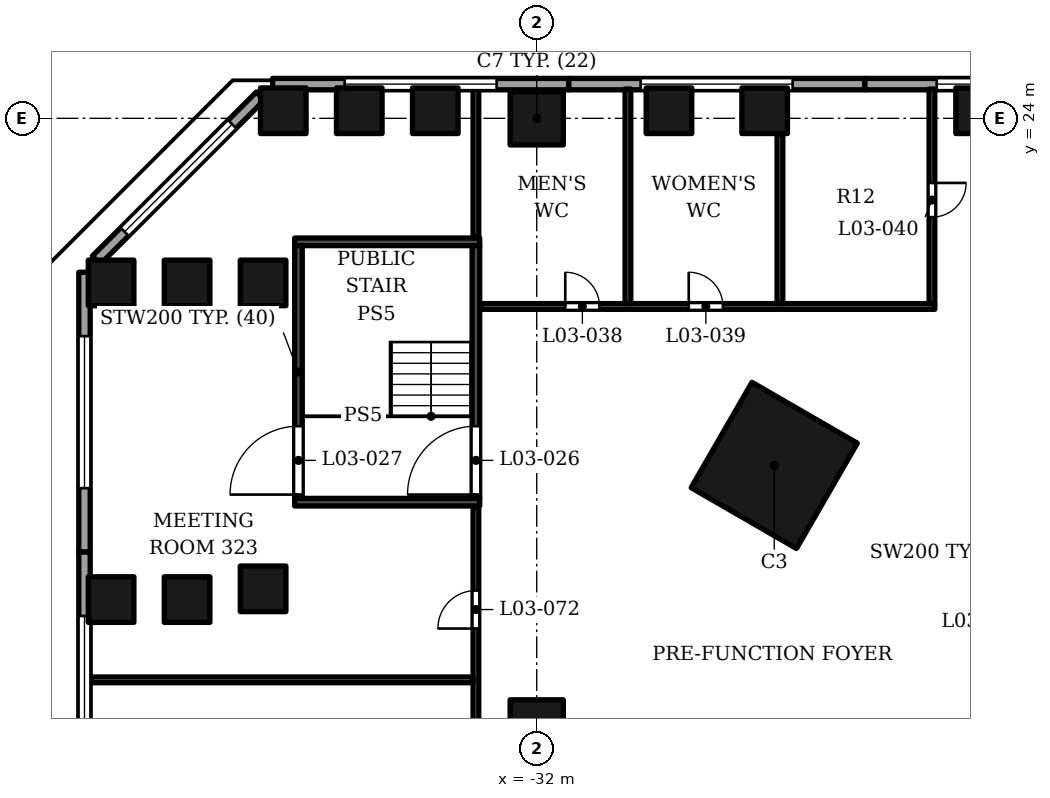
"""IFC4 building model, lengths in metres.
Left out: names, types, materials, properties, quantities, classifications, styles, units other than length and angle.
Written with IfcOpenShell. Run it as: python <this file> out.ifc"""

import sys

from ifc_helpers import new_model, si_unit, direction, frame, frame_2d, origin, origin_2d, place, context, subcontext, project, spatial, rectangle, extrude, element, fill, save


model = new_model("IFC4")
c1 = context("Model", 3, precision=1e-05, world=origin(), true_north=direction((0.0, 1.0)))
c2 = subcontext(c1, "Body", "Model", "MODEL_VIEW")
j1 = project(units=[si_unit("LENGTHUNIT", "METRE"), si_unit("PLANEANGLEUNIT", "RADIAN")], contexts=[c1])
p1 = place(None, origin())
s1 = spatial("IfcSite", under=j1, at=p1, CompositionType="ELEMENT")
p2 = place(p1, origin())
s2 = spatial("IfcBuilding", under=s1, at=p2, CompositionType="ELEMENT")
p3 = place(p2, frame((0.0, 0.0, 29.0)))
s3 = spatial("IfcBuildingStorey", under=s2, at=p3, CompositionType="ELEMENT", Elevation=29.0)
for number, where, z_axis, x_axis in (
    (1, (-32.0, 8.0, 0.0), (0.0, 0.0, 1.0), (1.0, 0.0, 0.0)),
    (2, (-32.0, 24.0, 0.0), (0.0, 0.0, 1.0), (1.0, 0.0, 0.0)),
):
    element("IfcColumn", number, at=place(p3, frame(where, z_axis=z_axis, x_axis=x_axis)), inside=s3, PredefinedType="COLUMN", context=c2, shape_type="SweptSolid", body=[
        extrude(rectangle(XDim=1.4, YDim=1.4, at=origin_2d()), origin(), (0.0, 0.0, 1.0), 5.5),
    ])
for number, where, z_axis, x_axis in (
    (3, (-39.2, 19.669, 0.0), (0.0, 0.0, 1.0), (1.0, 0.0, 0.0)),
    (4, (-34.669, 24.2, 0.0), (0.0, 0.0, 1.0), (1.0, 0.0, 0.0)),
    (5, (-39.2, 11.62, 0.0), (0.0, 0.0, 1.0), (1.0, 0.0, 0.0)),
    (6, (-26.002, 24.2, 0.0), (0.0, 0.0, 1.0), (1.0, 0.0, 0.0)),
    (7, (-41.2, 19.669, 0.0), (0.0, 0.0, 1.0), (1.0, 0.0, 0.0)),
    (8, (-36.669, 24.2, 0.0), (0.0, 0.0, 1.0), (1.0, 0.0, 0.0)),
    (9, (-41.2, 11.337, 0.0), (0.0, 0.0, 1.0), (1.0, 0.0, 0.0)),
    (10, (-28.52, 24.2, 0.0), (0.0, 0.0, 1.0), (1.0, 0.0, 0.0)),
    (11, (-20.372, 24.2, 0.0), (0.0, 0.0, 1.0), (1.0, 0.0, 0.0)),
    (12, (-43.2, 19.669, 0.0), (0.0, 0.0, 1.0), (1.0, 0.0, 0.0)),
    (13, (-38.669, 24.2, 0.0), (0.0, 0.0, 1.0), (1.0, 0.0, 0.0)),
    (14, (-43.2, 11.337, 0.0), (0.0, 0.0, 1.0), (1.0, 0.0, 0.0)),
):
    element("IfcColumn", number, at=place(p3, frame(where, z_axis=z_axis, x_axis=x_axis)), inside=s3, PredefinedType="COLUMN", context=c2, shape_type="SweptSolid", body=[
        extrude(rectangle(XDim=1.2, YDim=1.2, at=origin_2d()), origin(), (0.0, 0.0, 1.0), 5.5),
    ])
p4 = place(p3, frame((-25.75, 14.867, 0.0), z_axis=(0.0, 0.0, 1.0), x_axis=(0.866025386331, -0.50000003023, 0.0)))
e15 = element("IfcColumn", 15, at=p4, inside=s3, PredefinedType="COLUMN", context=c2, shape_type="SweptSolid", body=[
    extrude(rectangle(XDim=3.2, YDim=3.2, at=origin_2d()), origin(), (0.0, 0.0, 1.0), 5.5),
])
p5 = place(p3, frame((-15.58, 24.9, 0.0), z_axis=(0.0, 0.0, 1.0), x_axis=(-1.0, 0.0, 0.0)))
e16 = element("IfcWall", 16, at=p5, inside=s3, PredefinedType="SOLIDWALL", context=c2, shape_type="SweptSolid", body=[
    extrude(rectangle(XDim=7.79, YDim=0.3, at=frame_2d((3.895, 0.0))), origin(), (0.0, 0.0, 1.0), 4.1),
])
p6 = place(p5, frame((1.895, 0.0, 1.0)))
e17 = element("IfcOpeningElement", 17, at=p6, cuts=e16, PredefinedType="OPENING", context=c2, shape_type="SweptSolid", body=[
    extrude(rectangle(XDim=4.0, YDim=1.8, at=frame_2d((2.0, 0.9))), frame((0.0, 0.16, 0.0), z_axis=(0.0, -1.0, 0.0), x_axis=(1.0, 0.0, 0.0)), (0.0, 0.0, 1.0), 0.32),
])
p7 = place(p3, frame((-23.37, 24.9, 0.0), z_axis=(0.0, 0.0, 1.0), x_axis=(-1.0, 0.0, 0.0)))
e18 = element("IfcWall", 18, at=p7, inside=s3, PredefinedType="SOLIDWALL", context=c2, shape_type="SweptSolid", body=[
    extrude(rectangle(XDim=7.79, YDim=0.3, at=frame_2d((3.895, 0.0))), origin(), (0.0, 0.0, 1.0), 4.1),
])
p8 = place(p7, frame((1.895, 0.0, 1.0)))
e19 = element("IfcOpeningElement", 19, at=p8, cuts=e18, PredefinedType="OPENING", context=c2, shape_type="SweptSolid", body=[
    extrude(rectangle(XDim=4.0, YDim=1.8, at=frame_2d((2.0, 0.9))), frame((0.0, 0.16, 0.0), z_axis=(0.0, -1.0, 0.0), x_axis=(1.0, 0.0, 0.0)), (0.0, 0.0, 1.0), 0.32),
])
p9 = place(p3, frame((-31.16, 24.9, 0.0), z_axis=(0.0, 0.0, 1.0), x_axis=(-1.0, 0.0, 0.0)))
e20 = element("IfcWall", 20, at=p9, inside=s3, PredefinedType="SOLIDWALL", context=c2, shape_type="SweptSolid", body=[
    extrude(rectangle(XDim=7.79, YDim=0.3, at=frame_2d((3.895, 0.0))), origin(), (0.0, 0.0, 1.0), 4.1),
])
p10 = place(p9, frame((1.895, 0.0, 1.0)))
e21 = element("IfcOpeningElement", 21, at=p10, cuts=e20, PredefinedType="OPENING", context=c2, shape_type="SweptSolid", body=[
    extrude(rectangle(XDim=4.0, YDim=1.8, at=frame_2d((2.0, 0.9))), frame((0.0, 0.16, 0.0), z_axis=(0.0, -1.0, 0.0), x_axis=(1.0, 0.0, 0.0)), (0.0, 0.0, 1.0), 0.32),
])
p11 = place(p3, frame((-39.271, 24.588, 0.0), z_axis=(0.0, 0.0, 1.0), x_axis=(-0.707106781187, -0.707106781187, 0.0)))
e22 = element("IfcWall", 22, at=p11, inside=s3, PredefinedType="SOLIDWALL", context=c2, shape_type="SweptSolid", body=[
    extrude(rectangle(XDim=6.105, YDim=0.3, at=frame_2d((3.052, 0.0))), origin(), (0.0, 0.0, 1.0), 4.1),
])
p12 = place(p11, frame((1.052, 0.0, 1.0)))
e23 = element("IfcOpeningElement", 23, at=p12, cuts=e22, PredefinedType="OPENING", context=c2, shape_type="SweptSolid", body=[
    extrude(rectangle(XDim=4.0, YDim=1.8, at=frame_2d((2.0, 0.9))), frame((0.0, 0.16, 0.0), z_axis=(0.0, -1.0, 0.0), x_axis=(1.0, 0.0, 0.0)), (0.0, 0.0, 1.0), 0.32),
])
p13 = place(p3, frame((-43.9, 19.95, 0.0), z_axis=(0.0, 0.0, 1.0), x_axis=(0.0, -1.0, 0.0)))
e24 = element("IfcWall", 24, at=p13, inside=s3, PredefinedType="SOLIDWALL", context=c2, shape_type="SweptSolid", body=[
    extrude(rectangle(XDim=7.363, YDim=0.3, at=frame_2d((3.681, 0.0))), origin(), (0.0, 0.0, 1.0), 4.1),
])
p14 = place(p13, frame((1.681, 0.0, 1.0)))
e25 = element("IfcOpeningElement", 25, at=p14, cuts=e24, PredefinedType="OPENING", context=c2, shape_type="SweptSolid", body=[
    extrude(rectangle(XDim=4.0, YDim=1.8, at=frame_2d((2.0, 0.9))), frame((0.0, 0.16, 0.0), z_axis=(0.0, -1.0, 0.0), x_axis=(1.0, 0.0, 0.0)), (0.0, 0.0, 1.0), 0.32),
])
p15 = place(p3, frame((-43.9, 12.587, 0.0), z_axis=(0.0, 0.0, 1.0), x_axis=(0.0, -1.0, 0.0)))
e26 = element("IfcWall", 26, at=p15, inside=s3, PredefinedType="SOLIDWALL", context=c2, shape_type="SweptSolid", body=[
    extrude(rectangle(XDim=7.362, YDim=0.3, at=frame_2d((3.681, 0.0))), origin(), (0.0, 0.0, 1.0), 4.1),
])
p16 = place(p15, frame((1.681, 0.0, 1.0)))
e27 = element("IfcOpeningElement", 27, at=p16, cuts=e26, PredefinedType="OPENING", context=c2, shape_type="SweptSolid", body=[
    extrude(rectangle(XDim=4.0, YDim=1.8, at=frame_2d((2.0, 0.9))), frame((0.0, 0.16, 0.0), z_axis=(0.0, -1.0, 0.0), x_axis=(1.0, 0.0, 0.0)), (0.0, 0.0, 1.0), 0.32),
])
p17 = place(p3, frame((-37.75, 24.85, 5.5), z_axis=(0.0, 0.0, 1.0), x_axis=(-1.0, 0.0, 0.0)))
e28 = element("IfcWall", 28, at=p17, inside=s3, PredefinedType="PARAPET", context=c2, shape_type="SweptSolid", body=[
    extrude(rectangle(XDim=1.25, YDim=0.3, at=frame_2d((0.625, 0.0))), origin(), (0.0, 0.0, 1.0), 1.1),
])
p18 = place(p3, frame((-39.042, 24.745, 5.5), z_axis=(0.0, 0.0, 1.0), x_axis=(-0.707124572946, -0.70708898898, 0.0)))
e29 = element("IfcWall", 29, at=p18, inside=s3, PredefinedType="PARAPET", context=c2, shape_type="SweptSolid", body=[
    extrude(rectangle(XDim=6.861, YDim=0.3, at=frame_2d((3.431, 0.0))), origin(), (0.0, 0.0, 1.0), 1.1),
])
p19 = place(p3, frame((-43.85, 19.79, 5.5), z_axis=(0.0, 0.0, 1.0), x_axis=(0.0, -1.0, 0.0)))
e30 = element("IfcWall", 30, at=p19, inside=s3, PredefinedType="PARAPET", context=c2, shape_type="SweptSolid", body=[
    extrude(rectangle(XDim=14.698, YDim=0.3, at=frame_2d((7.349, 0.0))), origin(), (0.0, 0.0, 1.0), 1.1),
])
for number, where, z_axis, x_axis in (
    (31, (-38.37, 13.9, 0.0), (0.0, 0.0, 1.0), (1.0, 0.0, 0.0)),
    (32, (-38.37, 20.75, 0.0), (0.0, 0.0, 1.0), (1.0, 0.0, 0.0)),
):
    element("IfcWall", number, at=place(p3, frame(where, z_axis=z_axis, x_axis=x_axis)), inside=s3, PredefinedType="SOLIDWALL", context=c2, shape_type="SweptSolid", body=[
        extrude(rectangle(XDim=4.87, YDim=0.2, at=frame_2d((2.435, 0.0))), origin(), (0.0, 0.0, 1.0), 5.05),
    ])
p20 = place(p3, frame((-38.27, 14.0, 0.0), z_axis=(0.0, 0.0, 1.0), x_axis=(0.0, 1.0, 0.0)))
e33 = element("IfcWall", 33, at=p20, inside=s3, PredefinedType="SOLIDWALL", context=c2, shape_type="SweptSolid", body=[
    extrude(rectangle(XDim=6.65, YDim=0.2, at=frame_2d((3.325, 0.0))), origin(), (0.0, 0.0, 1.0), 5.05),
])
p21 = place(p20, frame((0.1, 0.0, 0.0)))
e34 = element("IfcOpeningElement", 34, at=p21, cuts=e33, PredefinedType="OPENING", context=c2, shape_type="SweptSolid", body=[
    extrude(rectangle(XDim=1.8, YDim=2.4, at=frame_2d((0.9, 1.2))), frame((0.0, 0.11, 0.0), z_axis=(0.0, -1.0, 0.0), x_axis=(1.0, 0.0, 0.0)), (0.0, 0.0, 1.0), 0.22),
])
p22 = place(p3, frame((-33.6, 14.0, 0.0), z_axis=(0.0, 0.0, 1.0), x_axis=(0.0, 1.0, 0.0)))
e35 = element("IfcWall", 35, at=p22, inside=s3, PredefinedType="SOLIDWALL", context=c2, shape_type="SweptSolid", body=[
    extrude(rectangle(XDim=6.65, YDim=0.2, at=frame_2d((3.325, 0.0))), origin(), (0.0, 0.0, 1.0), 5.05),
])
p23 = place(p22, frame((0.1, 0.0, 0.0)))
e36 = element("IfcOpeningElement", 36, at=p23, cuts=e35, PredefinedType="OPENING", context=c2, shape_type="SweptSolid", body=[
    extrude(rectangle(XDim=1.8, YDim=2.4, at=frame_2d((0.9, 1.2))), frame((0.0, 0.11, 0.0), z_axis=(0.0, -1.0, 0.0), x_axis=(1.0, 0.0, 0.0)), (0.0, 0.0, 1.0), 0.22),
])
p24 = place(p3, frame((-33.6, 4.69, 0.0), z_axis=(0.0, 0.0, 1.0), x_axis=(0.0, 1.0, 0.0)))
e37 = element("IfcWall", 37, at=p24, inside=s3, PredefinedType="PARTITIONING", context=c2, shape_type="SweptSolid", body=[
    extrude(rectangle(XDim=9.07, YDim=0.15, at=frame_2d((4.535, 0.0))), origin(), (0.0, 0.0, 1.0), 3.85),
])
p25 = place(p24, frame((0.261, 0.0, 0.0)))
e38 = element("IfcOpeningElement", 38, at=p25, cuts=e37, PredefinedType="OPENING", context=c2, shape_type="SweptSolid", body=[
    extrude(rectangle(XDim=1.0, YDim=2.1, at=frame_2d((0.5, 1.05))), frame((0.0, 0.085, 0.0), z_axis=(0.0, -1.0, 0.0), x_axis=(1.0, 0.0, 0.0)), (0.0, 0.0, 1.0), 0.17),
])
p26 = place(p24, frame((5.885, 0.0, 0.0)))
e39 = element("IfcOpeningElement", 39, at=p26, cuts=e37, PredefinedType="OPENING", context=c2, shape_type="SweptSolid", body=[
    extrude(rectangle(XDim=1.0, YDim=2.1, at=frame_2d((0.5, 1.05))), frame((0.0, 0.085, 0.0), z_axis=(0.0, -1.0, 0.0), x_axis=(1.0, 0.0, 0.0)), (0.0, 0.0, 1.0), 0.17),
])
p27 = place(p3, frame((-43.72, 9.225, 0.0), z_axis=(0.0, 0.0, 1.0), x_axis=(1.0, 0.0, 0.0)))
e40 = element("IfcWall", 40, at=p27, inside=s3, PredefinedType="PARTITIONING", context=c2, shape_type="SweptSolid", body=[
    extrude(rectangle(XDim=10.045, YDim=0.15, at=frame_2d((5.022, 0.0))), origin(), (0.0, 0.0, 1.0), 4.15),
])
p28 = place(p3, frame((-33.46, 19.05, 0.0), z_axis=(0.0, 0.0, 1.0), x_axis=(1.0, 0.0, 0.0)))
e41 = element("IfcWall", 41, at=p28, inside=s3, PredefinedType="PARTITIONING", context=c2, shape_type="SweptSolid", body=[
    extrude(rectangle(XDim=11.935, YDim=0.15, at=frame_2d((5.968, 0.0))), origin(), (0.0, 0.0, 1.0), 3.85),
])
p29 = place(p28, frame((2.211, 0.0, 0.0)))
e42 = element("IfcOpeningElement", 42, at=p29, cuts=e41, PredefinedType="OPENING", context=c2, shape_type="SweptSolid", body=[
    extrude(rectangle(XDim=0.9, YDim=2.1, at=frame_2d((0.45, 1.05))), frame((0.0, 0.085, 0.0), z_axis=(0.0, -1.0, 0.0), x_axis=(1.0, 0.0, 0.0)), (0.0, 0.0, 1.0), 0.17),
])
p30 = place(p28, frame((5.46, 0.0, 0.0)))
e43 = element("IfcOpeningElement", 43, at=p30, cuts=e41, PredefinedType="OPENING", context=c2, shape_type="SweptSolid", body=[
    extrude(rectangle(XDim=0.9, YDim=2.1, at=frame_2d((0.45, 1.05))), frame((0.0, 0.085, 0.0), z_axis=(0.0, -1.0, 0.0), x_axis=(1.0, 0.0, 0.0)), (0.0, 0.0, 1.0), 0.17),
])
p31 = place(p3, frame((-29.6, 19.125, 0.0), z_axis=(0.0, 0.0, 1.0), x_axis=(0.0, 1.0, 0.0)))
e44 = element("IfcWall", 44, at=p31, inside=s3, PredefinedType="PARTITIONING", context=c2, shape_type="SweptSolid", body=[
    extrude(rectangle(XDim=5.645, YDim=0.15, at=frame_2d((2.823, 0.0))), origin(), (0.0, 0.0, 1.0), 3.85),
])
p32 = place(p3, frame((-25.6, 19.125, 0.0), z_axis=(0.0, 0.0, 1.0), x_axis=(0.0, 1.0, 0.0)))
e45 = element("IfcWall", 45, at=p32, inside=s3, PredefinedType="PARTITIONING", context=c2, shape_type="SweptSolid", body=[
    extrude(rectangle(XDim=4.475, YDim=0.15, at=frame_2d((2.238, 0.0))), origin(), (0.0, 0.0, 1.0), 5.05),
])
p33 = place(p3, frame((-21.6, 19.125, 0.0), z_axis=(0.0, 0.0, 1.0), x_axis=(0.0, 1.0, 0.0)))
e46 = element("IfcWall", 46, at=p33, inside=s3, PredefinedType="PARTITIONING", context=c2, shape_type="SweptSolid", body=[
    extrude(rectangle(XDim=5.645, YDim=0.15, at=frame_2d((2.823, 0.0))), origin(), (0.0, 0.0, 1.0), 3.85),
])
p34 = place(p33, frame((2.275, 0.0, 0.0)))
e47 = element("IfcOpeningElement", 47, at=p34, cuts=e46, PredefinedType="OPENING", context=c2, shape_type="SweptSolid", body=[
    extrude(rectangle(XDim=0.9, YDim=2.1, at=frame_2d((0.45, 1.05))), frame((0.0, 0.085, 0.0), z_axis=(0.0, -1.0, 0.0), x_axis=(1.0, 0.0, 0.0)), (0.0, 0.0, 1.0), 0.17),
])
p35 = place(p3, frame((-33.6, 20.89, 0.0), z_axis=(0.0, 0.0, 1.0), x_axis=(0.0, 1.0, 0.0)))
e48 = element("IfcWall", 48, at=p35, inside=s3, PredefinedType="PARTITIONING", context=c2, shape_type="SweptSolid", body=[
    extrude(rectangle(XDim=3.88, YDim=0.15, at=frame_2d((1.94, 0.0))), origin(), (0.0, 0.0, 1.0), 5.05),
])
p36 = place(p6, origin())
e49 = element("IfcWindow", 49, at=p36, inside=s3, PartitioningType="SINGLE_PANEL", PredefinedType="WINDOW", context=c2, shape_type="SweptSolid", body=[
    extrude(rectangle(XDim=4.0, YDim=1.8, at=frame_2d((2.0, 0.9))), frame((0.0, 0.03, 0.0), z_axis=(0.0, -1.0, 0.0), x_axis=(1.0, 0.0, 0.0)), (0.0, 0.0, 1.0), 0.06),
])
fill(e17, e49)
p37 = place(p8, origin())
e50 = element("IfcWindow", 50, at=p37, inside=s3, PartitioningType="SINGLE_PANEL", PredefinedType="WINDOW", context=c2, shape_type="SweptSolid", body=[
    extrude(rectangle(XDim=4.0, YDim=1.8, at=frame_2d((2.0, 0.9))), frame((0.0, 0.03, 0.0), z_axis=(0.0, -1.0, 0.0), x_axis=(1.0, 0.0, 0.0)), (0.0, 0.0, 1.0), 0.06),
])
fill(e19, e50)
p38 = place(p10, origin())
e51 = element("IfcWindow", 51, at=p38, inside=s3, PartitioningType="SINGLE_PANEL", PredefinedType="WINDOW", context=c2, shape_type="SweptSolid", body=[
    extrude(rectangle(XDim=4.0, YDim=1.8, at=frame_2d((2.0, 0.9))), frame((0.0, 0.03, 0.0), z_axis=(0.0, -1.0, 0.0), x_axis=(1.0, 0.0, 0.0)), (0.0, 0.0, 1.0), 0.06),
])
fill(e21, e51)
p39 = place(p12, origin())
e52 = element("IfcWindow", 52, at=p39, inside=s3, PartitioningType="SINGLE_PANEL", PredefinedType="WINDOW", context=c2, shape_type="SweptSolid", body=[
    extrude(rectangle(XDim=4.0, YDim=1.8, at=frame_2d((2.0, 0.9))), frame((0.0, 0.03, 0.0), z_axis=(0.0, -1.0, 0.0), x_axis=(1.0, 0.0, 0.0)), (0.0, 0.0, 1.0), 0.06),
])
fill(e23, e52)
p40 = place(p14, origin())
e53 = element("IfcWindow", 53, at=p40, inside=s3, PartitioningType="SINGLE_PANEL", PredefinedType="WINDOW", context=c2, shape_type="SweptSolid", body=[
    extrude(rectangle(XDim=4.0, YDim=1.8, at=frame_2d((2.0, 0.9))), frame((0.0, 0.03, 0.0), z_axis=(0.0, -1.0, 0.0), x_axis=(1.0, 0.0, 0.0)), (0.0, 0.0, 1.0), 0.06),
])
fill(e25, e53)
p41 = place(p16, origin())
e54 = element("IfcWindow", 54, at=p41, inside=s3, PartitioningType="SINGLE_PANEL", PredefinedType="WINDOW", context=c2, shape_type="SweptSolid", body=[
    extrude(rectangle(XDim=4.0, YDim=1.8, at=frame_2d((2.0, 0.9))), frame((0.0, 0.03, 0.0), z_axis=(0.0, -1.0, 0.0), x_axis=(1.0, 0.0, 0.0)), (0.0, 0.0, 1.0), 0.06),
])
fill(e27, e54)
p42 = place(p23, origin())
e55 = element("IfcDoor", 55, at=p42, inside=s3, OperationType="DOUBLE_DOOR_SINGLE_SWING", PredefinedType="DOOR", context=c2, shape_type="SweptSolid", body=[
    extrude(rectangle(XDim=1.8, YDim=2.4, at=frame_2d((0.9, 1.2))), frame((0.0, 0.025, 0.0), z_axis=(0.0, -1.0, 0.0), x_axis=(1.0, 0.0, 0.0)), (0.0, 0.0, 1.0), 0.05),
])
fill(e36, e55)
p43 = place(p21, origin())
e56 = element("IfcDoor", 56, at=p43, inside=s3, OperationType="DOUBLE_DOOR_SINGLE_SWING", PredefinedType="DOOR", context=c2, shape_type="SweptSolid", body=[
    extrude(rectangle(XDim=1.8, YDim=2.4, at=frame_2d((0.9, 1.2))), frame((0.0, 0.025, 0.0), z_axis=(0.0, -1.0, 0.0), x_axis=(1.0, 0.0, 0.0)), (0.0, 0.0, 1.0), 0.05),
])
fill(e34, e56)
p44 = place(p29, origin())
e57 = element("IfcDoor", 57, at=p44, inside=s3, OperationType="SINGLE_SWING_LEFT", PredefinedType="DOOR", context=c2, shape_type="SweptSolid", body=[
    extrude(rectangle(XDim=0.9, YDim=2.1, at=frame_2d((0.45, 1.05))), frame((0.0, 0.025, 0.0), z_axis=(0.0, -1.0, 0.0), x_axis=(1.0, 0.0, 0.0)), (0.0, 0.0, 1.0), 0.05),
])
fill(e42, e57)
p45 = place(p30, origin())
e58 = element("IfcDoor", 58, at=p45, inside=s3, OperationType="SINGLE_SWING_LEFT", PredefinedType="DOOR", context=c2, shape_type="SweptSolid", body=[
    extrude(rectangle(XDim=0.9, YDim=2.1, at=frame_2d((0.45, 1.05))), frame((0.0, 0.025, 0.0), z_axis=(0.0, -1.0, 0.0), x_axis=(1.0, 0.0, 0.0)), (0.0, 0.0, 1.0), 0.05),
])
fill(e43, e58)
p46 = place(p34, origin())
e59 = element("IfcDoor", 59, at=p46, inside=s3, OperationType="SINGLE_SWING_RIGHT", PredefinedType="DOOR", context=c2, shape_type="SweptSolid", body=[
    extrude(rectangle(XDim=0.9, YDim=2.1, at=frame_2d((0.45, 1.05))), frame((0.0, 0.025, 0.0), z_axis=(0.0, -1.0, 0.0), x_axis=(1.0, 0.0, 0.0)), (0.0, 0.0, 1.0), 0.05),
])
fill(e47, e59)
p47 = place(p26, origin())
e60 = element("IfcDoor", 60, at=p47, inside=s3, OperationType="SINGLE_SWING_LEFT", PredefinedType="DOOR", context=c2, shape_type="SweptSolid", body=[
    extrude(rectangle(XDim=1.0, YDim=2.1, at=frame_2d((0.5, 1.05))), frame((0.0, 0.025, 0.0), z_axis=(0.0, -1.0, 0.0), x_axis=(1.0, 0.0, 0.0)), (0.0, 0.0, 1.0), 0.05),
])
fill(e39, e60)
save(model, sys.argv[1])
